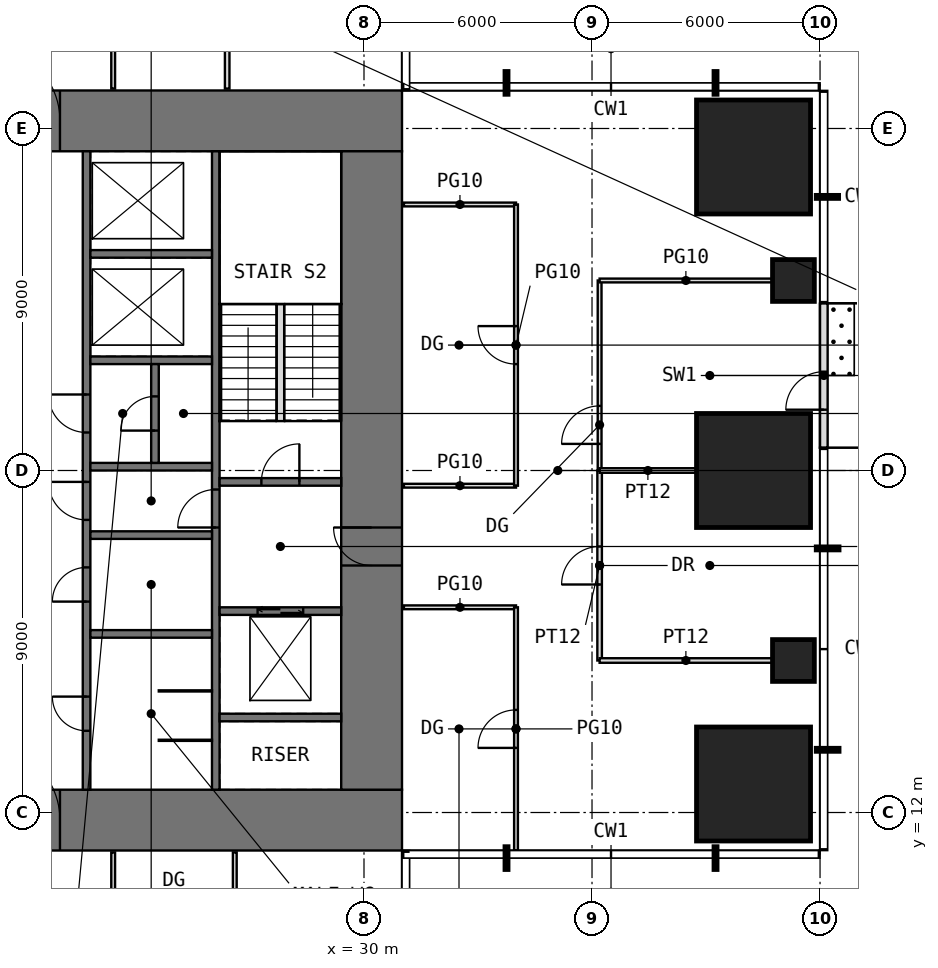
"""IFC4 building model, lengths in metres.
Left out: names, types, materials, properties, quantities, classifications, styles, units other than length and angle.
Written with IfcOpenShell. Run it as: python <this file> out.ifc"""

import sys

from ifc_helpers import new_model, si_unit, direction, frame, frame_2d, origin, origin_2d, place, context, subcontext, project, spatial, rectangle, extrude, element, fill, save


model = new_model("IFC4")
c1 = context("Model", 3, precision=1e-05, world=origin(), true_north=direction((0.0, 1.0)))
c2 = subcontext(c1, "Body", "Model", "MODEL_VIEW")
j1 = project(units=[si_unit("LENGTHUNIT", "METRE"), si_unit("PLANEANGLEUNIT", "RADIAN")], contexts=[c1])
p1 = place(None, origin())
s1 = spatial("IfcSite", under=j1, at=p1, CompositionType="ELEMENT")
p2 = place(p1, origin())
s2 = spatial("IfcBuilding", under=s1, at=p2, CompositionType="ELEMENT")
p3 = place(p2, frame((0.0, 0.0, 140.5)))
s3 = spatial("IfcBuildingStorey", under=s2, at=p3, CompositionType="ELEMENT", Elevation=140.5)
p4 = place(p3, frame((40.25, 12.75, 0.0), z_axis=(0.0, 0.0, 1.0), x_axis=(1.0, 0.0, 0.0)))
e1 = element("IfcColumn", 1, at=p4, inside=s3, PredefinedType="COLUMN", context=c2, shape_type="SweptSolid", body=[
    extrude(rectangle(XDim=3.0, YDim=3.0, at=origin_2d()), origin(), (0.0, 0.0, 1.0), 4.0),
])
p5 = place(p3, frame((41.3, 16.0, 0.0), z_axis=(0.0, 0.0, 1.0), x_axis=(1.0, 0.0, 0.0)))
e2 = element("IfcColumn", 2, at=p5, inside=s3, PredefinedType="COLUMN", context=c2, shape_type="SweptSolid", body=[
    extrude(rectangle(XDim=1.1, YDim=1.1, at=origin_2d()), origin(), (0.0, 0.0, 1.0), 4.0),
])
p6 = place(p3, frame((40.25, 21.0, 0.0), z_axis=(0.0, 0.0, 1.0), x_axis=(1.0, 0.0, 0.0)))
e3 = element("IfcColumn", 3, at=p6, inside=s3, PredefinedType="COLUMN", context=c2, shape_type="SweptSolid", body=[
    extrude(rectangle(XDim=3.0, YDim=3.0, at=origin_2d()), origin(), (0.0, 0.0, 1.0), 4.0),
])
p7 = place(p3, frame((41.3, 26.0, 0.0), z_axis=(0.0, 0.0, 1.0), x_axis=(1.0, 0.0, 0.0)))
e4 = element("IfcColumn", 4, at=p7, inside=s3, PredefinedType="COLUMN", context=c2, shape_type="SweptSolid", body=[
    extrude(rectangle(XDim=1.1, YDim=1.1, at=origin_2d()), origin(), (0.0, 0.0, 1.0), 4.0),
])
p8 = place(p3, frame((40.25, 29.25, 0.0), z_axis=(0.0, 0.0, 1.0), x_axis=(1.0, 0.0, 0.0)))
e5 = element("IfcColumn", 5, at=p8, inside=s3, PredefinedType="COLUMN", context=c2, shape_type="SweptSolid", body=[
    extrude(rectangle(XDim=3.0, YDim=3.0, at=origin_2d()), origin(), (0.0, 0.0, 1.0), 4.0),
])
p9 = place(p3, frame((42.1, 21.6, 0.0), z_axis=(0.0, 0.0, 1.0), x_axis=(0.0, 1.0, 0.0)))
e6 = element("IfcWall", 6, at=p9, inside=s3, PredefinedType="USERDEFINED", context=c2, shape_type="SweptSolid", body=[
    extrude(rectangle(XDim=3.8, YDim=0.2, at=frame_2d((1.9, 0.0))), origin(), (0.0, 0.0, 1.0), 3.75),
])
p10 = place(p9, frame((1.0, 0.0, 0.0)))
e7 = element("IfcOpeningElement", 7, at=p10, cuts=e6, PredefinedType="OPENING", context=c2, shape_type="SweptSolid", body=[
    extrude(rectangle(XDim=1.0, YDim=2.4, at=frame_2d((0.5, 1.2))), frame((0.0, 0.11, 0.0), z_axis=(0.0, -1.0, 0.0), x_axis=(1.0, 0.0, 0.0)), (0.0, 0.0, 1.0), 0.22),
])
p11 = place(p3, frame((11.0, 11.8, -0.05), z_axis=(0.0, 0.0, 1.0), x_axis=(1.0, 0.0, 0.0)))
e8 = element("IfcWall", 8, at=p11, inside=s3, PredefinedType="SHEAR", context=c2, shape_type="SweptSolid", body=[
    extrude(rectangle(XDim=20.0, YDim=1.6, at=frame_2d((10.0, 0.0))), origin(), (0.0, 0.0, 1.0), 4.0),
])
p12 = place(p11, frame((9.0, 0.0, 0.05)))
e9 = element("IfcOpeningElement", 9, at=p12, cuts=e8, PredefinedType="OPENING", context=c2, shape_type="SweptSolid", body=[
    extrude(rectangle(XDim=2.0, YDim=2.2, at=frame_2d((1.0, 1.1))), frame((0.0, 0.81, 0.0), z_axis=(0.0, -1.0, 0.0), x_axis=(1.0, 0.0, 0.0)), (0.0, 0.0, 1.0), 1.62),
])
p13 = place(p3, frame((11.0, 30.2, -0.05), z_axis=(0.0, 0.0, 1.0), x_axis=(1.0, 0.0, 0.0)))
e10 = element("IfcWall", 10, at=p13, inside=s3, PredefinedType="SHEAR", context=c2, shape_type="SweptSolid", body=[
    extrude(rectangle(XDim=20.0, YDim=1.6, at=frame_2d((10.0, 0.0))), origin(), (0.0, 0.0, 1.0), 4.0),
])
p14 = place(p13, frame((9.0, 0.0, 0.05)))
e11 = element("IfcOpeningElement", 11, at=p14, cuts=e10, PredefinedType="OPENING", context=c2, shape_type="SweptSolid", body=[
    extrude(rectangle(XDim=2.0, YDim=2.2, at=frame_2d((1.0, 1.1))), frame((0.0, 0.81, 0.0), z_axis=(0.0, -1.0, 0.0), x_axis=(1.0, 0.0, 0.0)), (0.0, 0.0, 1.0), 1.62),
])
p15 = place(p3, frame((30.2, 12.6, -0.05), z_axis=(0.0, 0.0, 1.0), x_axis=(0.0, 1.0, 0.0)))
e12 = element("IfcWall", 12, at=p15, inside=s3, PredefinedType="SHEAR", context=c2, shape_type="SweptSolid", body=[
    extrude(rectangle(XDim=16.8, YDim=1.6, at=frame_2d((8.4, 0.0))), origin(), (0.0, 0.0, 1.0), 4.0),
])
p16 = place(p15, frame((5.9, 0.0, 0.05)))
e13 = element("IfcOpeningElement", 13, at=p16, cuts=e12, PredefinedType="OPENING", context=c2, shape_type="SweptSolid", body=[
    extrude(rectangle(XDim=1.0, YDim=2.2, at=frame_2d((0.5, 1.1))), frame((0.0, 0.81, 0.0), z_axis=(0.0, -1.0, 0.0), x_axis=(1.0, 0.0, 0.0)), (0.0, 0.0, 1.0), 1.62),
])
p17 = place(p3, frame((22.7, 12.6, -0.05), z_axis=(0.0, 0.0, 1.0), x_axis=(0.0, 1.0, 0.0)))
e14 = element("IfcWall", 14, at=p17, inside=s3, PredefinedType="SHEAR", context=c2, shape_type="SweptSolid", body=[
    extrude(rectangle(XDim=16.8, YDim=0.2, at=frame_2d((8.4, 0.0))), origin(), (0.0, 0.0, 1.0), 4.0),
])
p18 = place(p17, frame((7.1, 0.0, 0.05)))
e15 = element("IfcOpeningElement", 15, at=p18, cuts=e14, PredefinedType="OPENING", context=c2, shape_type="SweptSolid", body=[
    extrude(rectangle(XDim=1.0, YDim=2.2, at=frame_2d((0.5, 1.1))), frame((0.0, 0.11, 0.0), z_axis=(0.0, -1.0, 0.0), x_axis=(1.0, 0.0, 0.0)), (0.0, 0.0, 1.0), 0.22),
])
p19 = place(p17, frame((1.55, 0.0, 0.05)))
e16 = element("IfcOpeningElement", 16, at=p19, cuts=e14, PredefinedType="OPENING", context=c2, shape_type="SweptSolid", body=[
    extrude(rectangle(XDim=0.9, YDim=2.2, at=frame_2d((0.45, 1.1))), frame((0.0, 0.11, 0.0), z_axis=(0.0, -1.0, 0.0), x_axis=(1.0, 0.0, 0.0)), (0.0, 0.0, 1.0), 0.22),
])
p20 = place(p17, frame((4.95, 0.0, 0.05)))
e17 = element("IfcOpeningElement", 17, at=p20, cuts=e14, PredefinedType="OPENING", context=c2, shape_type="SweptSolid", body=[
    extrude(rectangle(XDim=0.9, YDim=2.2, at=frame_2d((0.45, 1.1))), frame((0.0, 0.11, 0.0), z_axis=(0.0, -1.0, 0.0), x_axis=(1.0, 0.0, 0.0)), (0.0, 0.0, 1.0), 0.22),
])
p21 = place(p17, frame((9.4, 0.0, 0.05)))
e18 = element("IfcOpeningElement", 18, at=p21, cuts=e14, PredefinedType="OPENING", context=c2, shape_type="SweptSolid", body=[
    extrude(rectangle(XDim=1.0, YDim=2.2, at=frame_2d((0.5, 1.1))), frame((0.0, 0.11, 0.0), z_axis=(0.0, -1.0, 0.0), x_axis=(1.0, 0.0, 0.0)), (0.0, 0.0, 1.0), 0.22),
])
p22 = place(p3, frame((26.1, 12.6, -0.05), z_axis=(0.0, 0.0, 1.0), x_axis=(0.0, 1.0, 0.0)))
e19 = element("IfcWall", 19, at=p22, inside=s3, PredefinedType="SHEAR", context=c2, shape_type="SweptSolid", body=[
    extrude(rectangle(XDim=16.8, YDim=0.2, at=frame_2d((8.4, 0.0))), origin(), (0.0, 0.0, 1.0), 4.0),
])
p23 = place(p22, frame((6.9, 0.0, 0.05)))
e20 = element("IfcOpeningElement", 20, at=p23, cuts=e19, PredefinedType="OPENING", context=c2, shape_type="SweptSolid", body=[
    extrude(rectangle(XDim=1.0, YDim=2.2, at=frame_2d((0.5, 1.1))), frame((0.0, 0.11, 0.0), z_axis=(0.0, -1.0, 0.0), x_axis=(1.0, 0.0, 0.0)), (0.0, 0.0, 1.0), 0.22),
])
for number, where, z_axis, x_axis in (
    (21, (22.8, 16.7, -0.05), (0.0, 0.0, 1.0), (1.0, 0.0, 0.0)),
    (22, (22.8, 19.3, -0.05), (0.0, 0.0, 1.0), (1.0, 0.0, 0.0)),
    (23, (22.8, 21.1, -0.05), (0.0, 0.0, 1.0), (1.0, 0.0, 0.0)),
    (24, (22.8, 23.9, -0.05), (0.0, 0.0, 1.0), (1.0, 0.0, 0.0)),
    (25, (22.8, 26.7, -0.05), (0.0, 0.0, 1.0), (1.0, 0.0, 0.0)),
    (26, (26.2, 14.5, -0.05), (0.0, 0.0, 1.0), (1.0, 0.0, 0.0)),
):
    element("IfcWall", number, at=place(p3, frame(where, z_axis=z_axis, x_axis=x_axis)), inside=s3, PredefinedType="SHEAR", context=c2, shape_type="SweptSolid", body=[
        extrude(rectangle(XDim=3.2, YDim=0.2, at=frame_2d((1.6, 0.0))), origin(), (0.0, 0.0, 1.0), 4.0),
    ])
p24 = place(p3, frame((26.2, 17.3, -0.05), z_axis=(0.0, 0.0, 1.0), x_axis=(1.0, 0.0, 0.0)))
e27 = element("IfcWall", 27, at=p24, inside=s3, PredefinedType="SHEAR", context=c2, shape_type="SweptSolid", body=[
    extrude(rectangle(XDim=3.2, YDim=0.2, at=frame_2d((1.6, 0.0))), origin(), (0.0, 0.0, 1.0), 4.0),
])
p25 = place(p24, frame((1.0, 0.0, 0.05)))
e28 = element("IfcOpeningElement", 28, at=p25, cuts=e27, PredefinedType="OPENING", context=c2, shape_type="SweptSolid", body=[
    extrude(rectangle(XDim=1.2, YDim=2.2, at=frame_2d((0.6, 1.1))), frame((0.0, 0.11, 0.0), z_axis=(0.0, -1.0, 0.0), x_axis=(1.0, 0.0, 0.0)), (0.0, 0.0, 1.0), 0.22),
])
p26 = place(p3, frame((26.2, 20.7, -0.05), z_axis=(0.0, 0.0, 1.0), x_axis=(1.0, 0.0, 0.0)))
e29 = element("IfcWall", 29, at=p26, inside=s3, PredefinedType="SHEAR", context=c2, shape_type="SweptSolid", body=[
    extrude(rectangle(XDim=3.2, YDim=0.2, at=frame_2d((1.6, 0.0))), origin(), (0.0, 0.0, 1.0), 4.0),
])
p27 = place(p26, frame((1.1, 0.0, 0.05)))
e30 = element("IfcOpeningElement", 30, at=p27, cuts=e29, PredefinedType="OPENING", context=c2, shape_type="SweptSolid", body=[
    extrude(rectangle(XDim=1.0, YDim=2.2, at=frame_2d((0.5, 1.1))), frame((0.0, 0.11, 0.0), z_axis=(0.0, -1.0, 0.0), x_axis=(1.0, 0.0, 0.0)), (0.0, 0.0, 1.0), 0.22),
])
for number, where, z_axis, x_axis in (
    (31, (24.6, 13.9, 0.0), (0.0, 0.0, 1.0), (1.0, 0.0, 0.0)),
    (32, (24.6, 15.2, 0.0), (0.0, 0.0, 1.0), (1.0, 0.0, 0.0)),
):
    element("IfcWall", number, at=place(p3, frame(where, z_axis=z_axis, x_axis=x_axis)), inside=s3, PredefinedType="PARTITIONING", context=c2, shape_type="SweptSolid", body=[
        extrude(rectangle(XDim=1.4, YDim=0.03, at=frame_2d((0.7, 0.0))), origin(), (0.0, 0.0, 1.0), 3.75),
    ])
p28 = place(p3, frame((24.5, 21.2, -0.05), z_axis=(0.0, 0.0, 1.0), x_axis=(0.0, 1.0, 0.0)))
e33 = element("IfcWall", 33, at=p28, inside=s3, PredefinedType="SHEAR", context=c2, shape_type="SweptSolid", body=[
    extrude(rectangle(XDim=2.6, YDim=0.2, at=frame_2d((1.3, 0.0))), origin(), (0.0, 0.0, 1.0), 4.0),
])
p29 = place(p28, frame((0.85, 0.0, 0.05)))
e34 = element("IfcOpeningElement", 34, at=p29, cuts=e33, PredefinedType="OPENING", context=c2, shape_type="SweptSolid", body=[
    extrude(rectangle(XDim=0.9, YDim=2.2, at=frame_2d((0.45, 1.1))), frame((0.0, 0.11, 0.0), z_axis=(0.0, -1.0, 0.0), x_axis=(1.0, 0.0, 0.0)), (0.0, 0.0, 1.0), 0.22),
])
for number, where, z_axis, x_axis in (
    (35, (23.4, 8.0, 0.0), (0.0, 0.0, 1.0), (0.0, 1.0, 0.0)),
    (36, (23.4, 31.05, 0.0), (0.0, 0.0, 1.0), (0.0, 1.0, 0.0)),
):
    element("IfcWall", number, at=place(p3, frame(where, z_axis=z_axis, x_axis=x_axis)), inside=s3, PredefinedType="PARTITIONING", context=c2, shape_type="SweptSolid", body=[
        extrude(rectangle(XDim=2.95, YDim=0.1, at=frame_2d((1.475, 0.0))), origin(), (0.0, 0.0, 1.0), 3.75),
    ])
p30 = place(p3, frame((26.4, 31.05, 0.0), z_axis=(0.0, 0.0, 1.0), x_axis=(0.0, 1.0, 0.0)))
e37 = element("IfcWall", 37, at=p30, inside=s3, PredefinedType="PARTITIONING", context=c2, shape_type="SweptSolid", body=[
    extrude(rectangle(XDim=2.45, YDim=0.12, at=frame_2d((1.225, 0.0))), origin(), (0.0, 0.0, 1.0), 3.75),
])
for number, where, z_axis, x_axis in (
    (38, (26.6, 8.0, 0.0), (0.0, 0.0, 1.0), (0.0, 1.0, 0.0)),
    (39, (31.05, 17.4, 0.0), (0.0, 0.0, 1.0), (1.0, 0.0, 0.0)),
    (40, (31.05, 20.6, 0.0), (0.0, 0.0, 1.0), (1.0, 0.0, 0.0)),
    (41, (31.05, 28.0, 0.0), (0.0, 0.0, 1.0), (1.0, 0.0, 0.0)),
):
    element("IfcWall", number, at=place(p3, frame(where, z_axis=z_axis, x_axis=x_axis)), inside=s3, PredefinedType="PARTITIONING", context=c2, shape_type="SweptSolid", body=[
        extrude(rectangle(XDim=2.95, YDim=0.1, at=frame_2d((1.475, 0.0))), origin(), (0.0, 0.0, 1.0), 3.75),
    ])
p31 = place(p3, frame((34.0, 11.0, 0.0), z_axis=(0.0, 0.0, 1.0), x_axis=(0.0, 1.0, 0.0)))
e42 = element("IfcWall", 42, at=p31, inside=s3, PredefinedType="PARTITIONING", context=c2, shape_type="SweptSolid", body=[
    extrude(rectangle(XDim=6.4, YDim=0.1, at=frame_2d((3.2, 0.0))), origin(), (0.0, 0.0, 1.0), 3.75),
])
p32 = place(p31, frame((2.7, 0.0, 0.0)))
e43 = element("IfcOpeningElement", 43, at=p32, cuts=e42, PredefinedType="OPENING", context=c2, shape_type="SweptSolid", body=[
    extrude(rectangle(XDim=1.0, YDim=2.4, at=frame_2d((0.5, 1.2))), frame((0.0, 0.06, 0.0), z_axis=(0.0, -1.0, 0.0), x_axis=(1.0, 0.0, 0.0)), (0.0, 0.0, 1.0), 0.12),
])
p33 = place(p3, frame((34.0, 20.6, 0.0), z_axis=(0.0, 0.0, 1.0), x_axis=(0.0, 1.0, 0.0)))
e44 = element("IfcWall", 44, at=p33, inside=s3, PredefinedType="PARTITIONING", context=c2, shape_type="SweptSolid", body=[
    extrude(rectangle(XDim=7.4, YDim=0.1, at=frame_2d((3.7, 0.0))), origin(), (0.0, 0.0, 1.0), 3.75),
])
p34 = place(p33, frame((3.2, 0.0, 0.0)))
e45 = element("IfcOpeningElement", 45, at=p34, cuts=e44, PredefinedType="OPENING", context=c2, shape_type="SweptSolid", body=[
    extrude(rectangle(XDim=1.0, YDim=2.4, at=frame_2d((0.5, 1.2))), frame((0.0, 0.06, 0.0), z_axis=(0.0, -1.0, 0.0), x_axis=(1.0, 0.0, 0.0)), (0.0, 0.0, 1.0), 0.12),
])
p35 = place(p3, frame((36.2, 16.0, 0.0), z_axis=(0.0, 0.0, 1.0), x_axis=(0.0, 1.0, 0.0)))
e46 = element("IfcWall", 46, at=p35, inside=s3, PredefinedType="PARTITIONING", context=c2, shape_type="SweptSolid", body=[
    extrude(rectangle(XDim=5.0, YDim=0.12, at=frame_2d((2.5, 0.0))), origin(), (0.0, 0.0, 1.0), 3.75),
])
p36 = place(p35, frame((2.0, 0.0, 0.0)))
e47 = element("IfcOpeningElement", 47, at=p36, cuts=e46, PredefinedType="OPENING", context=c2, shape_type="SweptSolid", body=[
    extrude(rectangle(XDim=1.0, YDim=2.2, at=frame_2d((0.5, 1.1))), frame((0.0, 0.07, 0.0), z_axis=(0.0, -1.0, 0.0), x_axis=(1.0, 0.0, 0.0)), (0.0, 0.0, 1.0), 0.14),
])
p37 = place(p3, frame((36.2, 16.0, 0.0), z_axis=(0.0, 0.0, 1.0), x_axis=(1.0, 0.0, 0.0)))
e48 = element("IfcWall", 48, at=p37, inside=s3, PredefinedType="PARTITIONING", context=c2, shape_type="SweptSolid", body=[
    extrude(rectangle(XDim=4.54, YDim=0.12, at=frame_2d((2.27, 0.0))), origin(), (0.0, 0.0, 1.0), 3.75),
])
p38 = place(p3, frame((36.2, 21.0, 0.0), z_axis=(0.0, 0.0, 1.0), x_axis=(0.0, 1.0, 0.0)))
e49 = element("IfcWall", 49, at=p38, inside=s3, PredefinedType="PARTITIONING", context=c2, shape_type="SweptSolid", body=[
    extrude(rectangle(XDim=5.0, YDim=0.1, at=frame_2d((2.5, 0.0))), origin(), (0.0, 0.0, 1.0), 3.75),
])
p39 = place(p38, frame((0.7, 0.0, 0.0)))
e50 = element("IfcOpeningElement", 50, at=p39, cuts=e49, PredefinedType="OPENING", context=c2, shape_type="SweptSolid", body=[
    extrude(rectangle(XDim=1.0, YDim=2.4, at=frame_2d((0.5, 1.2))), frame((0.0, 0.06, 0.0), z_axis=(0.0, -1.0, 0.0), x_axis=(1.0, 0.0, 0.0)), (0.0, 0.0, 1.0), 0.12),
])
p40 = place(p3, frame((36.2, 21.0, 0.0), z_axis=(0.0, 0.0, 1.0), x_axis=(1.0, 0.0, 0.0)))
e51 = element("IfcWall", 51, at=p40, inside=s3, PredefinedType="PARTITIONING", context=c2, shape_type="SweptSolid", body=[
    extrude(rectangle(XDim=2.54, YDim=0.12, at=frame_2d((1.27, 0.0))), origin(), (0.0, 0.0, 1.0), 3.75),
])
p41 = place(p3, frame((36.2, 26.0, 0.0), z_axis=(0.0, 0.0, 1.0), x_axis=(1.0, 0.0, 0.0)))
e52 = element("IfcWall", 52, at=p41, inside=s3, PredefinedType="PARTITIONING", context=c2, shape_type="SweptSolid", body=[
    extrude(rectangle(XDim=4.54, YDim=0.1, at=frame_2d((2.27, 0.0))), origin(), (0.0, 0.0, 1.0), 3.75),
])
p42 = place(p3, frame((27.8, 22.3, 0.0), z_axis=(0.0, 0.0, 1.0), x_axis=(0.0, 1.0, 0.0)))
e53 = element("IfcWall", 53, at=p42, inside=s3, PredefinedType="PARTITIONING", context=c2, shape_type="SweptSolid", body=[
    extrude(rectangle(XDim=3.08, YDim=0.2, at=frame_2d((1.54, 0.0))), origin(), (0.0, 0.0, 1.0), 4.0),
])
p43 = place(p10, origin())
e54 = element("IfcDoor", 54, at=p43, inside=s3, OperationType="SINGLE_SWING_LEFT", PredefinedType="DOOR", context=c2, shape_type="SweptSolid", body=[
    extrude(rectangle(XDim=1.0, YDim=2.4, at=frame_2d((0.5, 1.2))), frame((0.0, 0.025, 0.0), z_axis=(0.0, -1.0, 0.0), x_axis=(1.0, 0.0, 0.0)), (0.0, 0.0, 1.0), 0.05),
])
fill(e7, e54)
p44 = place(p12, origin())
e55 = element("IfcDoor", 55, at=p44, inside=s3, OperationType="DOUBLE_DOOR_SINGLE_SWING", PredefinedType="DOOR", context=c2, shape_type="SweptSolid", body=[
    extrude(rectangle(XDim=2.0, YDim=2.2, at=frame_2d((1.0, 1.1))), frame((0.0, 0.025, 0.0), z_axis=(0.0, -1.0, 0.0), x_axis=(1.0, 0.0, 0.0)), (0.0, 0.0, 1.0), 0.05),
])
fill(e9, e55)
p45 = place(p14, origin())
e56 = element("IfcDoor", 56, at=p45, inside=s3, OperationType="DOUBLE_DOOR_SINGLE_SWING", PredefinedType="DOOR", context=c2, shape_type="SweptSolid", body=[
    extrude(rectangle(XDim=2.0, YDim=2.2, at=frame_2d((1.0, 1.1))), frame((0.0, 0.025, 0.0), z_axis=(0.0, -1.0, 0.0), x_axis=(1.0, 0.0, 0.0)), (0.0, 0.0, 1.0), 0.05),
])
fill(e11, e56)
p46 = place(p16, origin())
e57 = element("IfcDoor", 57, at=p46, inside=s3, OperationType="SINGLE_SWING_RIGHT", PredefinedType="DOOR", context=c2, shape_type="SweptSolid", body=[
    extrude(rectangle(XDim=1.0, YDim=2.2, at=frame_2d((0.5, 1.1))), frame((0.0, 0.025, 0.0), z_axis=(0.0, -1.0, 0.0), x_axis=(1.0, 0.0, 0.0)), (0.0, 0.0, 1.0), 0.05),
])
fill(e13, e57)
p47 = place(p27, origin())
e58 = element("IfcDoor", 58, at=p47, inside=s3, OperationType="SINGLE_SWING_RIGHT", PredefinedType="DOOR", context=c2, shape_type="SweptSolid", body=[
    extrude(rectangle(XDim=1.0, YDim=2.2, at=frame_2d((0.5, 1.1))), frame((0.0, 0.025, 0.0), z_axis=(0.0, -1.0, 0.0), x_axis=(1.0, 0.0, 0.0)), (0.0, 0.0, 1.0), 0.05),
])
fill(e30, e58)
p48 = place(p23, origin())
e59 = element("IfcDoor", 59, at=p48, inside=s3, OperationType="SINGLE_SWING_LEFT", PredefinedType="DOOR", context=c2, shape_type="SweptSolid", body=[
    extrude(rectangle(XDim=1.0, YDim=2.2, at=frame_2d((0.5, 1.1))), frame((0.0, 0.025, 0.0), z_axis=(0.0, -1.0, 0.0), x_axis=(1.0, 0.0, 0.0)), (0.0, 0.0, 1.0), 0.05),
])
fill(e20, e59)
p49 = place(p18, origin())
e60 = element("IfcDoor", 60, at=p49, inside=s3, OperationType="SINGLE_SWING_RIGHT", PredefinedType="DOOR", context=c2, shape_type="SweptSolid", body=[
    extrude(rectangle(XDim=1.0, YDim=2.2, at=frame_2d((0.5, 1.1))), frame((0.0, 0.025, 0.0), z_axis=(0.0, -1.0, 0.0), x_axis=(1.0, 0.0, 0.0)), (0.0, 0.0, 1.0), 0.05),
])
fill(e15, e60)
p50 = place(p19, origin())
e61 = element("IfcDoor", 61, at=p50, inside=s3, OperationType="SINGLE_SWING_RIGHT", PredefinedType="DOOR", context=c2, shape_type="SweptSolid", body=[
    extrude(rectangle(XDim=0.9, YDim=2.2, at=frame_2d((0.45, 1.1))), frame((0.0, 0.025, 0.0), z_axis=(0.0, -1.0, 0.0), x_axis=(1.0, 0.0, 0.0)), (0.0, 0.0, 1.0), 0.05),
])
fill(e16, e61)
p51 = place(p20, origin())
e62 = element("IfcDoor", 62, at=p51, inside=s3, OperationType="SINGLE_SWING_LEFT", PredefinedType="DOOR", context=c2, shape_type="SweptSolid", body=[
    extrude(rectangle(XDim=0.9, YDim=2.2, at=frame_2d((0.45, 1.1))), frame((0.0, 0.025, 0.0), z_axis=(0.0, -1.0, 0.0), x_axis=(1.0, 0.0, 0.0)), (0.0, 0.0, 1.0), 0.05),
])
fill(e17, e62)
p52 = place(p21, origin())
e63 = element("IfcDoor", 63, at=p52, inside=s3, OperationType="SINGLE_SWING_RIGHT", PredefinedType="DOOR", context=c2, shape_type="SweptSolid", body=[
    extrude(rectangle(XDim=1.0, YDim=2.2, at=frame_2d((0.5, 1.1))), frame((0.0, 0.025, 0.0), z_axis=(0.0, -1.0, 0.0), x_axis=(1.0, 0.0, 0.0)), (0.0, 0.0, 1.0), 0.05),
])
fill(e18, e63)
p53 = place(p29, origin())
e64 = element("IfcDoor", 64, at=p53, inside=s3, OperationType="SINGLE_SWING_LEFT", PredefinedType="DOOR", context=c2, shape_type="SweptSolid", body=[
    extrude(rectangle(XDim=0.9, YDim=2.2, at=frame_2d((0.45, 1.1))), frame((0.0, 0.025, 0.0), z_axis=(0.0, -1.0, 0.0), x_axis=(1.0, 0.0, 0.0)), (0.0, 0.0, 1.0), 0.05),
])
fill(e34, e64)
p54 = place(p32, origin())
e65 = element("IfcDoor", 65, at=p54, inside=s3, OperationType="SINGLE_SWING_LEFT", PredefinedType="DOOR", context=c2, shape_type="SweptSolid", body=[
    extrude(rectangle(XDim=1.0, YDim=2.4, at=frame_2d((0.5, 1.2))), frame((0.0, 0.025, 0.0), z_axis=(0.0, -1.0, 0.0), x_axis=(1.0, 0.0, 0.0)), (0.0, 0.0, 1.0), 0.05),
])
fill(e43, e65)
p55 = place(p34, origin())
e66 = element("IfcDoor", 66, at=p55, inside=s3, OperationType="SINGLE_SWING_RIGHT", PredefinedType="DOOR", context=c2, shape_type="SweptSolid", body=[
    extrude(rectangle(XDim=1.0, YDim=2.4, at=frame_2d((0.5, 1.2))), frame((0.0, 0.025, 0.0), z_axis=(0.0, -1.0, 0.0), x_axis=(1.0, 0.0, 0.0)), (0.0, 0.0, 1.0), 0.05),
])
fill(e45, e66)
p56 = place(p36, origin())
e67 = element("IfcDoor", 67, at=p56, inside=s3, OperationType="SINGLE_SWING_LEFT", PredefinedType="DOOR", context=c2, shape_type="SweptSolid", body=[
    extrude(rectangle(XDim=1.0, YDim=2.2, at=frame_2d((0.5, 1.1))), frame((0.0, 0.025, 0.0), z_axis=(0.0, -1.0, 0.0), x_axis=(1.0, 0.0, 0.0)), (0.0, 0.0, 1.0), 0.05),
])
fill(e47, e67)
p57 = place(p39, origin())
e68 = element("IfcDoor", 68, at=p57, inside=s3, OperationType="SINGLE_SWING_LEFT", PredefinedType="DOOR", context=c2, shape_type="SweptSolid", body=[
    extrude(rectangle(XDim=1.0, YDim=2.4, at=frame_2d((0.5, 1.2))), frame((0.0, 0.025, 0.0), z_axis=(0.0, -1.0, 0.0), x_axis=(1.0, 0.0, 0.0)), (0.0, 0.0, 1.0), 0.05),
])
fill(e50, e68)
p58 = place(p25, origin())
e69 = element("IfcDoor", 69, at=p58, inside=s3, OperationType="DOUBLE_DOOR_SLIDING", PredefinedType="DOOR", context=c2, shape_type="SweptSolid", body=[
    extrude(rectangle(XDim=1.2, YDim=2.2, at=frame_2d((0.6, 1.1))), frame((0.0, 0.025, 0.0), z_axis=(0.0, -1.0, 0.0), x_axis=(1.0, 0.0, 0.0)), (0.0, 0.0, 1.0), 0.05),
])
fill(e28, e69)
save(model, sys.argv[1])
